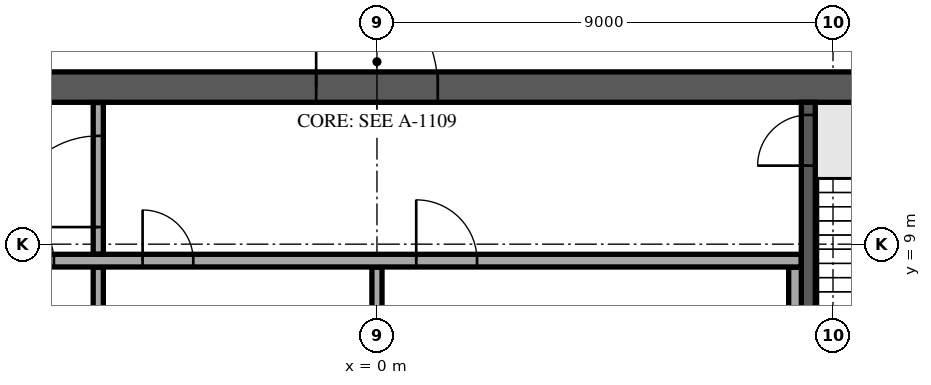
"""IFC4 building model, lengths in metres.
Left out: names, types, materials, properties, quantities, classifications, styles, units other than length and angle.
Written with IfcOpenShell. Run it as: python <this file> out.ifc"""

import sys

from ifc_helpers import new_model, si_unit, direction, frame, frame_2d, origin, place, context, subcontext, project, spatial, rectangle, extrude, element, fill, save


model = new_model("IFC4")
c1 = context("Model", 3, precision=1e-05, world=origin(), true_north=direction((0.0, 1.0)))
c2 = subcontext(c1, "Body", "Model", "MODEL_VIEW")
j1 = project(units=[si_unit("LENGTHUNIT", "METRE"), si_unit("PLANEANGLEUNIT", "RADIAN")], contexts=[c1])
p1 = place(None, origin())
s1 = spatial("IfcSite", under=j1, at=p1, CompositionType="ELEMENT")
p2 = place(p1, origin())
s2 = spatial("IfcBuilding", under=s1, at=p2, CompositionType="ELEMENT")
p3 = place(p2, frame((0.0, 0.0, 350.1)))
s3 = spatial("IfcBuildingStorey", under=s2, at=p3, CompositionType="ELEMENT", Elevation=350.1)
p4 = place(p3, frame((-12.4, 12.1, 0.0), z_axis=(0.0, 0.0, 1.0), x_axis=(1.0, 0.0, 0.0)))
e1 = element("IfcWall", 1, at=p4, inside=s3, PredefinedType="SHEAR", context=c2, shape_type="SweptSolid", body=[
    extrude(rectangle(XDim=24.8, YDim=0.6, at=frame_2d((12.4, 0.0))), origin(), (0.0, 0.0, 1.0), 7.7),
])
p5 = place(p4, frame((11.2, 0.0, 0.0)))
e2 = element("IfcOpeningElement", 2, at=p5, cuts=e1, PredefinedType="OPENING", context=c2, shape_type="SweptSolid", body=[
    extrude(rectangle(XDim=2.4, YDim=2.4, at=frame_2d((1.2, 1.2))), frame((0.0, 0.31, 0.0), z_axis=(0.0, -1.0, 0.0), x_axis=(1.0, 0.0, 0.0)), (0.0, 0.0, 1.0), 0.62),
])
p6 = place(p4, frame((22.025, 0.0, 0.0)))
e3 = element("IfcOpeningElement", 3, at=p6, cuts=e1, PredefinedType="OPENING", context=c2, shape_type="SweptSolid", body=[
    extrude(rectangle(XDim=1.2, YDim=2.1, at=frame_2d((0.6, 1.05))), frame((0.0, 0.31, 0.0), z_axis=(0.0, -1.0, 0.0), x_axis=(1.0, 0.0, 0.0)), (0.0, 0.0, 1.0), 0.62),
])
p7 = place(p4, frame((1.0, 0.0, 0.0)))
e4 = element("IfcOpeningElement", 4, at=p7, cuts=e1, PredefinedType="OPENING", context=c2, shape_type="SweptSolid", body=[
    extrude(rectangle(XDim=1.0, YDim=2.1, at=frame_2d((0.5, 1.05))), frame((0.0, 0.31, 0.0), z_axis=(0.0, -1.0, 0.0), x_axis=(1.0, 0.0, 0.0)), (0.0, 0.0, 1.0), 0.62),
])
p8 = place(p3, frame((8.512, 4.55, 0.0), z_axis=(0.0, 0.0, 1.0), x_axis=(0.0, 1.0, 0.0)))
e5 = element("IfcWall", 5, at=p8, inside=s3, PredefinedType="SOLIDWALL", context=c2, shape_type="SweptSolid", body=[
    extrude(rectangle(XDim=7.25, YDim=0.275, at=frame_2d((3.625, 0.0))), origin(), (0.0, 0.0, 1.0), 7.7),
])
p9 = place(p8, frame((6.0, 0.0, 0.0)))
e6 = element("IfcOpeningElement", 6, at=p9, cuts=e5, PredefinedType="OPENING", context=c2, shape_type="SweptSolid", body=[
    extrude(rectangle(XDim=1.0, YDim=2.1, at=frame_2d((0.5, 1.05))), frame((0.0, 0.147, 0.0), z_axis=(0.0, -1.0, 0.0), x_axis=(1.0, 0.0, 0.0)), (0.0, 0.0, 1.0), 0.295),
])
for number, where, z_axis, x_axis in (
    (7, (-5.5, 5.855, 0.0), (0.0, 0.0, 1.0), (0.0, 1.0, 0.0)),
    (8, (0.0, 5.855, 0.0), (0.0, 0.0, 1.0), (0.0, 1.0, 0.0)),
):
    element("IfcWall", number, at=place(p3, frame(where, z_axis=z_axis, x_axis=x_axis)), inside=s3, PredefinedType="PARTITIONING", context=c2, shape_type="SweptSolid", body=[
        extrude(rectangle(XDim=2.69, YDim=0.2, at=frame_2d((1.345, 0.0))), origin(), (0.0, 0.0, 1.0), 7.7),
    ])
p10 = place(p3, frame((8.25, 5.855, 0.0), z_axis=(0.0, 0.0, 1.0), x_axis=(0.0, 1.0, 0.0)))
e9 = element("IfcWall", 9, at=p10, inside=s3, PredefinedType="PARTITIONING", context=c2, shape_type="SweptSolid", body=[
    extrude(rectangle(XDim=2.69, YDim=0.25, at=frame_2d((1.345, 0.0))), origin(), (0.0, 0.0, 1.0), 7.7),
])
p11 = place(p3, frame((-8.35, 8.675, 0.0), z_axis=(0.0, 0.0, 1.0), x_axis=(1.0, 0.0, 0.0)))
e10 = element("IfcWall", 10, at=p11, inside=s3, PredefinedType="PARTITIONING", context=c2, shape_type="SweptSolid", body=[
    extrude(rectangle(XDim=16.72, YDim=0.25, at=frame_2d((8.36, 0.0))), origin(), (0.0, 0.0, 1.0), 7.7),
])
p12 = place(p11, frame((0.975, 0.0, 0.0)))
e11 = element("IfcOpeningElement", 11, at=p12, cuts=e10, PredefinedType="OPENING", context=c2, shape_type="SweptSolid", body=[
    extrude(rectangle(XDim=1.0, YDim=2.1, at=frame_2d((0.5, 1.05))), frame((0.0, 0.135, 0.0), z_axis=(0.0, -1.0, 0.0), x_axis=(1.0, 0.0, 0.0)), (0.0, 0.0, 1.0), 0.27),
])
p13 = place(p11, frame((3.725, 0.0, 0.0)))
e12 = element("IfcOpeningElement", 12, at=p13, cuts=e10, PredefinedType="OPENING", context=c2, shape_type="SweptSolid", body=[
    extrude(rectangle(XDim=1.0, YDim=2.1, at=frame_2d((0.5, 1.05))), frame((0.0, 0.135, 0.0), z_axis=(0.0, -1.0, 0.0), x_axis=(1.0, 0.0, 0.0)), (0.0, 0.0, 1.0), 0.27),
])
p14 = place(p11, frame((9.125, 0.0, 0.0)))
e13 = element("IfcOpeningElement", 13, at=p14, cuts=e10, PredefinedType="OPENING", context=c2, shape_type="SweptSolid", body=[
    extrude(rectangle(XDim=1.2, YDim=2.1, at=frame_2d((0.6, 1.05))), frame((0.0, 0.135, 0.0), z_axis=(0.0, -1.0, 0.0), x_axis=(1.0, 0.0, 0.0)), (0.0, 0.0, 1.0), 0.27),
])
p15 = place(p3, frame((-5.5, 8.805, 0.0), z_axis=(0.0, 0.0, 1.0), x_axis=(0.0, 1.0, 0.0)))
e14 = element("IfcWall", 14, at=p15, inside=s3, PredefinedType="PARTITIONING", context=c2, shape_type="SweptSolid", body=[
    extrude(rectangle(XDim=2.99, YDim=0.2, at=frame_2d((1.495, 0.0))), origin(), (0.0, 0.0, 1.0), 7.7),
])
p16 = place(p15, frame((0.532, 0.0, 0.0)))
e15 = element("IfcOpeningElement", 15, at=p16, cuts=e14, PredefinedType="OPENING", context=c2, shape_type="SweptSolid", body=[
    extrude(rectangle(XDim=1.8, YDim=2.1, at=frame_2d((0.9, 1.05))), frame((0.0, 0.11, 0.0), z_axis=(0.0, -1.0, 0.0), x_axis=(1.0, 0.0, 0.0)), (0.0, 0.0, 1.0), 0.22),
])
p17 = place(p5, origin())
e16 = element("IfcDoor", 16, at=p17, inside=s3, OperationType="SINGLE_SWING_LEFT", PredefinedType="DOOR", context=c2, shape_type="SweptSolid", body=[
    extrude(rectangle(XDim=2.4, YDim=2.4, at=frame_2d((1.2, 1.2))), frame((0.0, 0.025, 0.0), z_axis=(0.0, -1.0, 0.0), x_axis=(1.0, 0.0, 0.0)), (0.0, 0.0, 1.0), 0.05),
])
fill(e2, e16)
p18 = place(p9, origin())
e17 = element("IfcDoor", 17, at=p18, inside=s3, OperationType="SINGLE_SWING_LEFT", PredefinedType="DOOR", context=c2, shape_type="SweptSolid", body=[
    extrude(rectangle(XDim=1.0, YDim=2.1, at=frame_2d((0.5, 1.05))), frame((0.0, 0.025, 0.0), z_axis=(0.0, -1.0, 0.0), x_axis=(1.0, 0.0, 0.0)), (0.0, 0.0, 1.0), 0.05),
])
fill(e6, e17)
p19 = place(p12, origin())
e18 = element("IfcDoor", 18, at=p19, inside=s3, OperationType="SINGLE_SWING_RIGHT", PredefinedType="DOOR", context=c2, shape_type="SweptSolid", body=[
    extrude(rectangle(XDim=1.0, YDim=2.1, at=frame_2d((0.5, 1.05))), frame((0.0, 0.025, 0.0), z_axis=(0.0, -1.0, 0.0), x_axis=(1.0, 0.0, 0.0)), (0.0, 0.0, 1.0), 0.05),
])
fill(e11, e18)
p20 = place(p13, origin())
e19 = element("IfcDoor", 19, at=p20, inside=s3, OperationType="SINGLE_SWING_RIGHT", PredefinedType="DOOR", context=c2, shape_type="SweptSolid", body=[
    extrude(rectangle(XDim=1.0, YDim=2.1, at=frame_2d((0.5, 1.05))), frame((0.0, 0.025, 0.0), z_axis=(0.0, -1.0, 0.0), x_axis=(1.0, 0.0, 0.0)), (0.0, 0.0, 1.0), 0.05),
])
fill(e12, e19)
p21 = place(p14, origin())
e20 = element("IfcDoor", 20, at=p21, inside=s3, OperationType="SINGLE_SWING_LEFT", PredefinedType="DOOR", context=c2, shape_type="SweptSolid", body=[
    extrude(rectangle(XDim=1.2, YDim=2.1, at=frame_2d((0.6, 1.05))), frame((0.0, 0.025, 0.0), z_axis=(0.0, -1.0, 0.0), x_axis=(1.0, 0.0, 0.0)), (0.0, 0.0, 1.0), 0.05),
])
fill(e13, e20)
p22 = place(p16, origin())
e21 = element("IfcDoor", 21, at=p22, inside=s3, OperationType="SINGLE_SWING_LEFT", PredefinedType="DOOR", context=c2, shape_type="SweptSolid", body=[
    extrude(rectangle(XDim=1.8, YDim=2.1, at=frame_2d((0.9, 1.05))), frame((0.0, 0.025, 0.0), z_axis=(0.0, -1.0, 0.0), x_axis=(1.0, 0.0, 0.0)), (0.0, 0.0, 1.0), 0.05),
])
fill(e15, e21)
save(model, sys.argv[1])
